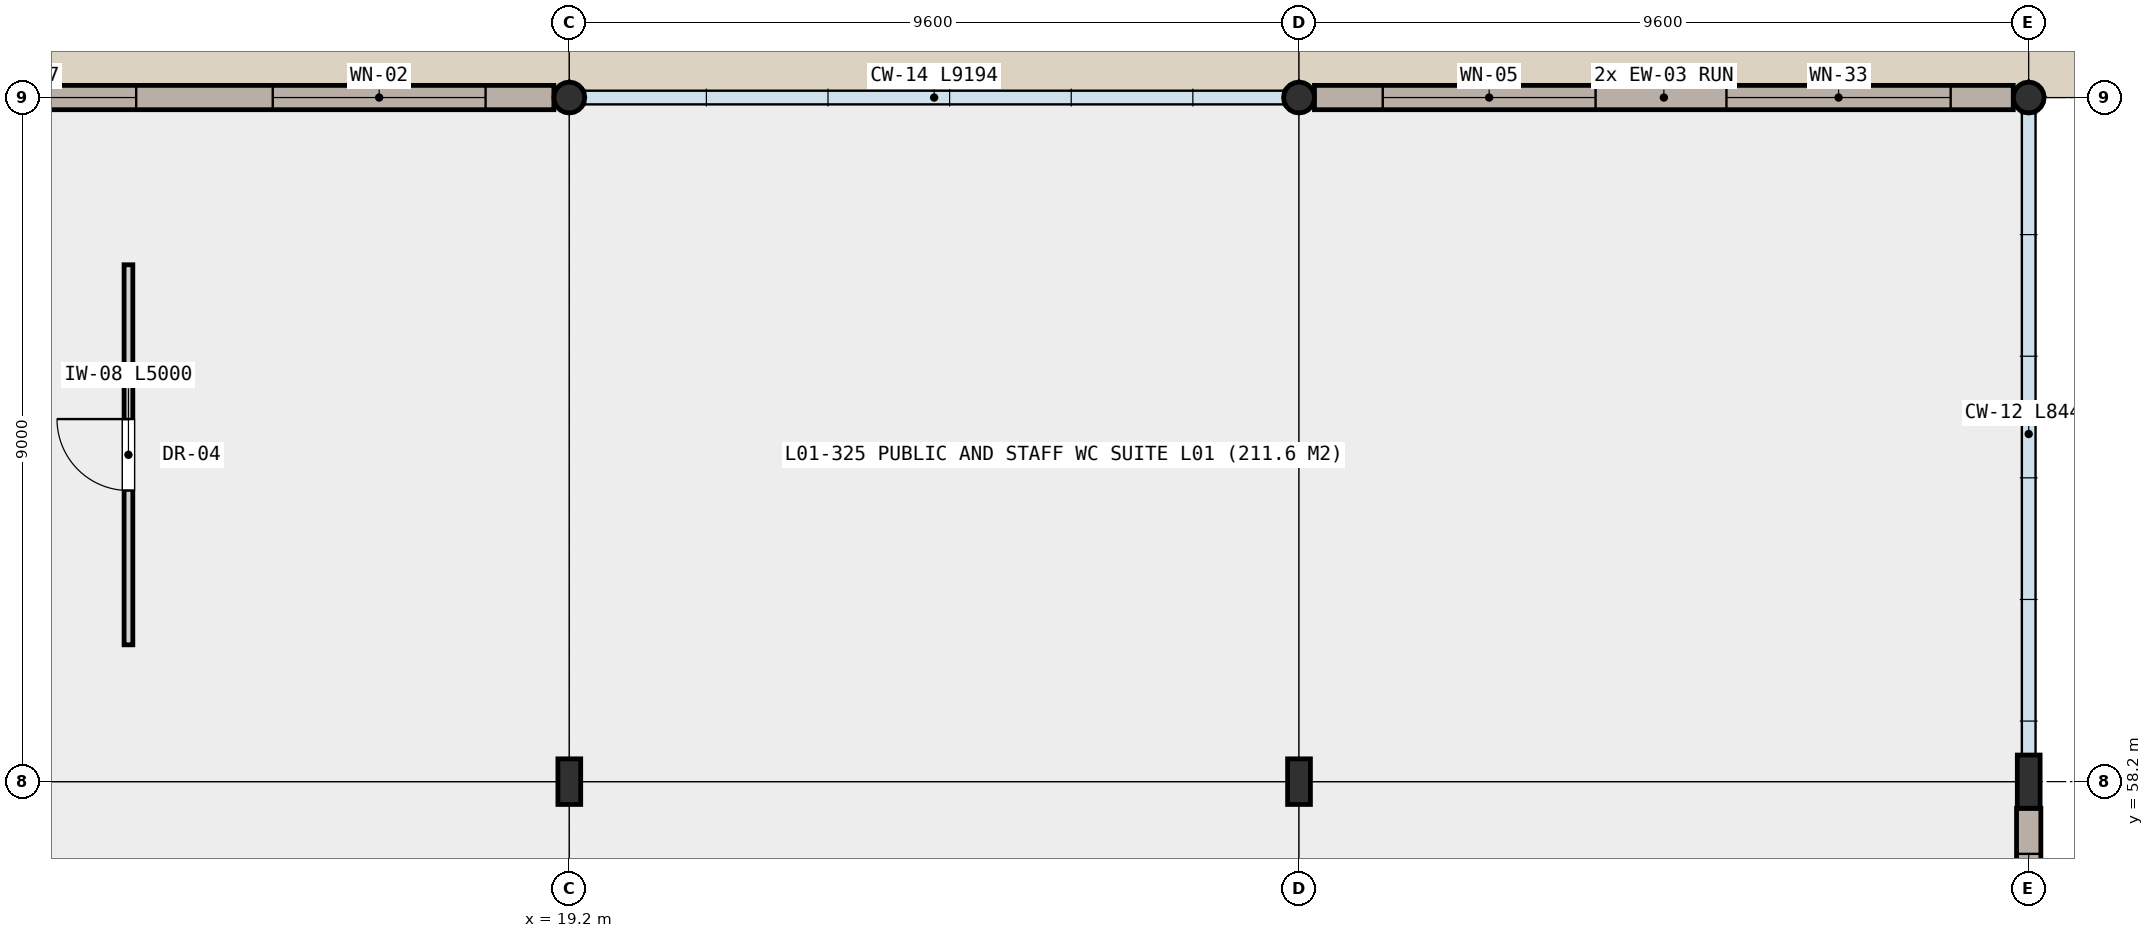
"""IFC4 building model, lengths in metres.
Left out: names, types, materials, properties, quantities, classifications, styles, units other than length and angle.
Written with IfcOpenShell. Run it as: python <this file> out.ifc"""

import sys

from ifc_helpers import new_model, si_unit, direction, frame, frame_2d, origin, origin_2d, place, context, subcontext, project, spatial, rectangle, hollow_circle, i_section, extrude, element, fill, save


model = new_model("IFC4")
c1 = context("Model", 3, precision=1e-05, world=origin(), true_north=direction((0.0, 1.0)))
c2 = subcontext(c1, "Body", "Model", "MODEL_VIEW")
j1 = project(units=[si_unit("LENGTHUNIT", "METRE"), si_unit("PLANEANGLEUNIT", "RADIAN")], contexts=[c1])
p1 = place(None, origin())
s1 = spatial("IfcSite", under=j1, at=p1, CompositionType="ELEMENT")
p2 = place(p1, origin())
s2 = spatial("IfcBuilding", under=s1, at=p2, CompositionType="ELEMENT")
p3 = place(p2, frame((0.0, 0.0, 5.4)))
s3 = spatial("IfcBuildingStorey", under=s2, at=p3, CompositionType="ELEMENT", Elevation=5.4)
p4 = place(p3, frame((19.2, 58.2, 0.0), z_axis=(0.0, 0.0, 1.0), x_axis=(1.0, 0.0, 0.0)))
e1 = element("IfcColumn", 1, at=p4, inside=s3, PredefinedType="COLUMN", context=c2, shape_type="SweptSolid", body=[
    extrude(i_section(OverallWidth=0.3, OverallDepth=0.6, WebThickness=0.015, FlangeThickness=0.03, FilletRadius=0.027, at=origin_2d()), origin(), (0.0, 0.0, 1.0), 4.8),
])
p5 = place(p3, frame((19.2, 67.2, 0.0), z_axis=(0.0, 0.0, 1.0), x_axis=(1.0, 0.0, 0.0)))
e2 = element("IfcColumn", 2, at=p5, inside=s3, PredefinedType="COLUMN", context=c2, shape_type="SweptSolid", body=[
    extrude(hollow_circle(Radius=0.203, WallThickness=0.02, at=origin_2d()), origin(), (0.0, 0.0, 1.0), 4.8),
])
p6 = place(p3, frame((28.8, 58.2, 0.0), z_axis=(0.0, 0.0, 1.0), x_axis=(1.0, 0.0, 0.0)))
e3 = element("IfcColumn", 3, at=p6, inside=s3, PredefinedType="COLUMN", context=c2, shape_type="SweptSolid", body=[
    extrude(i_section(OverallWidth=0.3, OverallDepth=0.6, WebThickness=0.015, FlangeThickness=0.03, FilletRadius=0.027, at=origin_2d()), origin(), (0.0, 0.0, 1.0), 4.8),
])
p7 = place(p3, frame((28.8, 67.2, 0.0), z_axis=(0.0, 0.0, 1.0), x_axis=(1.0, 0.0, 0.0)))
e4 = element("IfcColumn", 4, at=p7, inside=s3, PredefinedType="COLUMN", context=c2, shape_type="SweptSolid", body=[
    extrude(hollow_circle(Radius=0.203, WallThickness=0.02, at=origin_2d()), origin(), (0.0, 0.0, 1.0), 4.8),
])
p8 = place(p3, frame((38.4, 58.2, 0.0), z_axis=(0.0, 0.0, 1.0), x_axis=(1.0, 0.0, 0.0)))
e5 = element("IfcColumn", 5, at=p8, inside=s3, PredefinedType="COLUMN", context=c2, shape_type="SweptSolid", body=[
    extrude(i_section(OverallWidth=0.3, OverallDepth=0.7, WebThickness=0.017, FlangeThickness=0.032, FilletRadius=0.027, at=origin_2d()), origin(), (0.0, 0.0, 1.0), 4.8),
])
p9 = place(p3, frame((38.4, 67.2, 0.0), z_axis=(0.0, 0.0, 1.0), x_axis=(1.0, 0.0, 0.0)))
e6 = element("IfcColumn", 6, at=p9, inside=s3, PredefinedType="COLUMN", context=c2, shape_type="SweptSolid", body=[
    extrude(hollow_circle(Radius=0.203, WallThickness=0.02, at=origin_2d()), origin(), (0.0, 0.0, 1.0), 4.788),
])
p10 = place(p3, frame((9.803, 67.2, 0.0), z_axis=(0.0, 0.0, 1.0), x_axis=(1.0, 0.0, 0.0)))
e7 = element("IfcWall", 7, at=p10, inside=s3, PredefinedType="SOLIDWALL", context=c2, shape_type="SweptSolid", body=[
    extrude(rectangle(XDim=9.194, YDim=0.32, at=frame_2d((4.597, 0.0))), origin(), (0.0, 0.0, 1.0), 3.91),
])
p11 = place(p10, frame((0.898, 0.0, 0.85)))
e8 = element("IfcOpeningElement", 8, at=p11, cuts=e7, PredefinedType="OPENING", context=c2, shape_type="SweptSolid", body=[
    extrude(rectangle(XDim=2.8, YDim=1.5, at=frame_2d((1.4, 0.75))), frame((0.0, 0.17, 0.0), z_axis=(0.0, -1.0, 0.0), x_axis=(1.0, 0.0, 0.0)), (0.0, 0.0, 1.0), 0.34),
])
p12 = place(p10, frame((5.495, 0.0, 0.85)))
e9 = element("IfcOpeningElement", 9, at=p12, cuts=e7, PredefinedType="OPENING", context=c2, shape_type="SweptSolid", body=[
    extrude(rectangle(XDim=2.8, YDim=1.85, at=frame_2d((1.4, 0.925))), frame((0.0, 0.17, 0.0), z_axis=(0.0, -1.0, 0.0), x_axis=(1.0, 0.0, 0.0)), (0.0, 0.0, 1.0), 0.34),
])
p13 = place(p3, frame((29.003, 67.2, 0.0), z_axis=(0.0, 0.0, 1.0), x_axis=(1.0, 0.0, 0.0)))
e10 = element("IfcWall", 10, at=p13, inside=s3, PredefinedType="SOLIDWALL", context=c2, shape_type="SweptSolid", body=[
    extrude(rectangle(XDim=9.194, YDim=0.32, at=frame_2d((4.597, 0.0))), origin(), (0.0, 0.0, 1.0), 4.17),
])
p14 = place(p13, frame((0.898, 0.0, 0.85)))
e11 = element("IfcOpeningElement", 11, at=p14, cuts=e10, PredefinedType="OPENING", context=c2, shape_type="SweptSolid", body=[
    extrude(rectangle(XDim=2.8, YDim=2.15, at=frame_2d((1.4, 1.075))), frame((0.0, 0.17, 0.0), z_axis=(0.0, -1.0, 0.0), x_axis=(1.0, 0.0, 0.0)), (0.0, 0.0, 1.0), 0.34),
])
p15 = place(p13, frame((5.42, 0.0, 0.85)))
e12 = element("IfcOpeningElement", 12, at=p15, cuts=e10, PredefinedType="OPENING", context=c2, shape_type="SweptSolid", body=[
    extrude(rectangle(XDim=2.95, YDim=1.5, at=frame_2d((1.475, 0.75))), frame((0.0, 0.17, 0.0), z_axis=(0.0, -1.0, 0.0), x_axis=(1.0, 0.0, 0.0)), (0.0, 0.0, 1.0), 0.34),
])
p16 = place(p3, frame((38.4, 57.85, 0.0), z_axis=(0.0, 0.0, 1.0), x_axis=(0.0, -1.0, 0.0)))
e13 = element("IfcWall", 13, at=p16, inside=s3, PredefinedType="SOLIDWALL", context=c2, shape_type="SweptSolid", body=[
    extrude(rectangle(XDim=8.3, YDim=0.32, at=frame_2d((4.15, 0.0))), origin(), (0.0, 0.0, 1.0), 4.17),
])
p17 = place(p16, frame((0.6, 0.0, 0.85)))
e14 = element("IfcOpeningElement", 14, at=p17, cuts=e13, PredefinedType="OPENING", context=c2, shape_type="SweptSolid", body=[
    extrude(rectangle(XDim=2.95, YDim=1.85, at=frame_2d((1.475, 0.925))), frame((0.0, 0.17, 0.0), z_axis=(0.0, -1.0, 0.0), x_axis=(1.0, 0.0, 0.0)), (0.0, 0.0, 1.0), 0.34),
])
p18 = place(p16, frame((4.75, 0.0, 0.85)))
e15 = element("IfcOpeningElement", 15, at=p18, cuts=e13, PredefinedType="OPENING", context=c2, shape_type="SweptSolid", body=[
    extrude(rectangle(XDim=2.95, YDim=2.15, at=frame_2d((1.475, 1.075))), frame((0.0, 0.17, 0.0), z_axis=(0.0, -1.0, 0.0), x_axis=(1.0, 0.0, 0.0)), (0.0, 0.0, 1.0), 0.34),
])
p19 = place(p3, frame((13.4, 60.0, 0.0), z_axis=(0.0, 0.0, 1.0), x_axis=(0.0, 1.0, 0.0)))
e16 = element("IfcWall", 16, at=p19, inside=s3, PredefinedType="PARTITIONING", context=c2, shape_type="SweptSolid", body=[
    extrude(rectangle(XDim=5.0, YDim=0.115, at=frame_2d((2.5, 0.0))), origin(), (0.0, 0.0, 1.0), 4.54),
])
p20 = place(p19, frame((2.03, 0.0, 0.0)))
e17 = element("IfcOpeningElement", 17, at=p20, cuts=e16, PredefinedType="OPENING", context=c2, shape_type="SweptSolid", body=[
    extrude(rectangle(XDim=0.94, YDim=2.12, at=frame_2d((0.47, 1.06))), frame((0.0, 0.067, 0.0), z_axis=(0.0, -1.0, 0.0), x_axis=(1.0, 0.0, 0.0)), (0.0, 0.0, 1.0), 0.135),
])
p21 = place(p11, origin())
e18 = element("IfcWindow", 18, at=p21, inside=s3, PartitioningType="SINGLE_PANEL", PredefinedType="WINDOW", context=c2, shape_type="SweptSolid", body=[
    extrude(rectangle(XDim=2.8, YDim=1.5, at=frame_2d((1.4, 0.75))), frame((0.0, 0.03, 0.0), z_axis=(0.0, -1.0, 0.0), x_axis=(1.0, 0.0, 0.0)), (0.0, 0.0, 1.0), 0.06),
])
fill(e8, e18)
p22 = place(p12, origin())
e19 = element("IfcWindow", 19, at=p22, inside=s3, PartitioningType="SINGLE_PANEL", PredefinedType="WINDOW", context=c2, shape_type="SweptSolid", body=[
    extrude(rectangle(XDim=2.8, YDim=1.85, at=frame_2d((1.4, 0.925))), frame((0.0, 0.03, 0.0), z_axis=(0.0, -1.0, 0.0), x_axis=(1.0, 0.0, 0.0)), (0.0, 0.0, 1.0), 0.06),
])
fill(e9, e19)
p23 = place(p14, origin())
e20 = element("IfcWindow", 20, at=p23, inside=s3, PartitioningType="SINGLE_PANEL", PredefinedType="WINDOW", context=c2, shape_type="SweptSolid", body=[
    extrude(rectangle(XDim=2.8, YDim=2.15, at=frame_2d((1.4, 1.075))), frame((0.0, 0.03, 0.0), z_axis=(0.0, -1.0, 0.0), x_axis=(1.0, 0.0, 0.0)), (0.0, 0.0, 1.0), 0.06),
])
fill(e11, e20)
p24 = place(p15, origin())
e21 = element("IfcWindow", 21, at=p24, inside=s3, PartitioningType="SINGLE_PANEL", PredefinedType="WINDOW", context=c2, shape_type="SweptSolid", body=[
    extrude(rectangle(XDim=2.95, YDim=1.5, at=frame_2d((1.475, 0.75))), frame((0.0, 0.03, 0.0), z_axis=(0.0, -1.0, 0.0), x_axis=(1.0, 0.0, 0.0)), (0.0, 0.0, 1.0), 0.06),
])
fill(e12, e21)
p25 = place(p17, origin())
e22 = element("IfcWindow", 22, at=p25, inside=s3, PartitioningType="SINGLE_PANEL", PredefinedType="WINDOW", context=c2, shape_type="SweptSolid", body=[
    extrude(rectangle(XDim=2.95, YDim=1.85, at=frame_2d((1.475, 0.925))), frame((0.0, 0.03, 0.0), z_axis=(0.0, -1.0, 0.0), x_axis=(1.0, 0.0, 0.0)), (0.0, 0.0, 1.0), 0.06),
])
fill(e14, e22)
p26 = place(p20, origin())
e23 = element("IfcDoor", 23, at=p26, inside=s3, OperationType="SINGLE_SWING_RIGHT", PredefinedType="DOOR", context=c2, shape_type="SweptSolid", body=[
    extrude(rectangle(XDim=0.94, YDim=2.12, at=frame_2d((0.47, 1.06))), frame((0.0, 0.025, 0.0), z_axis=(0.0, -1.0, 0.0), x_axis=(1.0, 0.0, 0.0)), (0.0, 0.0, 1.0), 0.05),
])
fill(e17, e23)
save(model, sys.argv[1])
